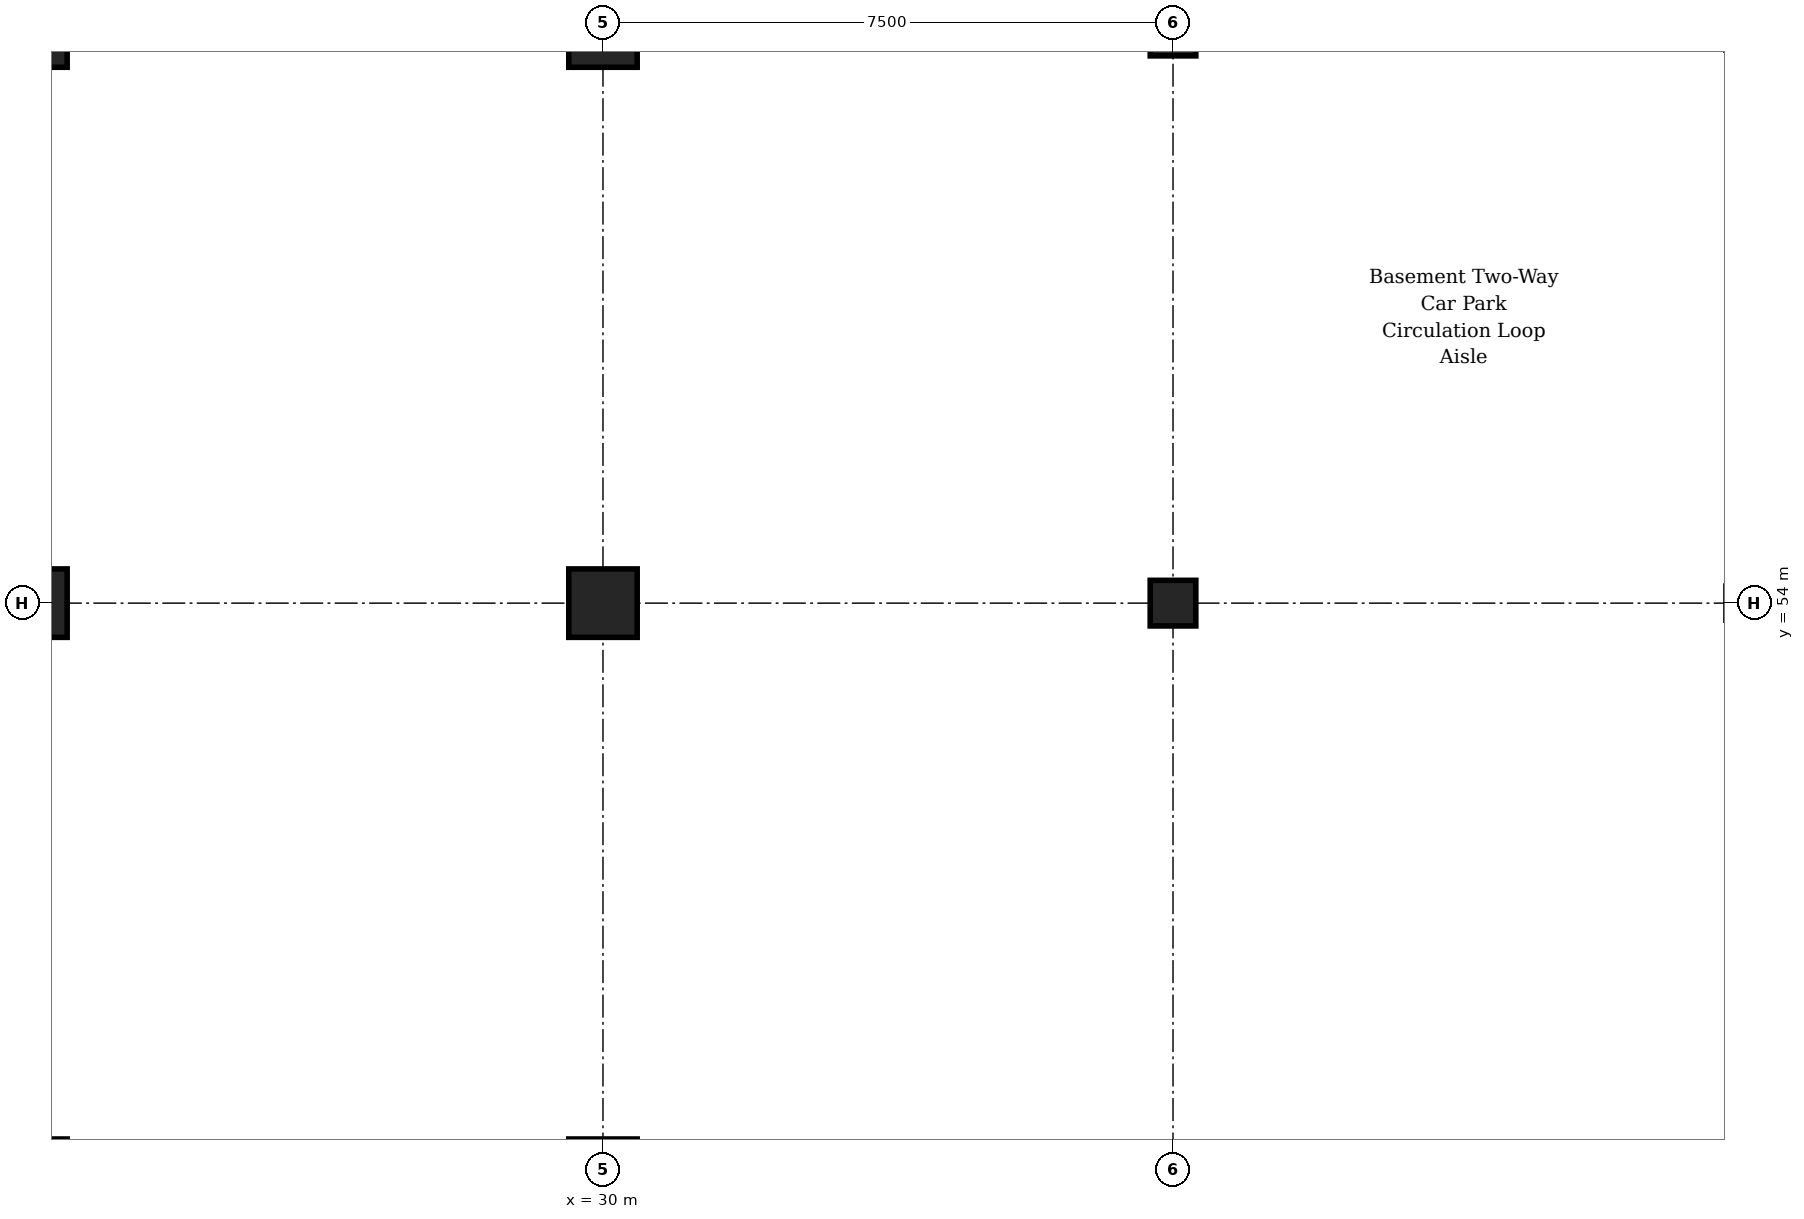
"""IFC4 building model, lengths in metres.
Left out: names, types, materials, properties, quantities, classifications, styles, units other than length and angle.
Written with IfcOpenShell. Run it as: python <this file> out.ifc"""

import sys

from ifc_helpers import new_model, si_unit, direction, frame, origin, origin_2d, place, context, subcontext, project, spatial, rectangle, circle, extrude, element, save


model = new_model("IFC4")
c1 = context("Model", 3, precision=1e-05, world=origin(), true_north=direction((0.0, 1.0)))
c2 = subcontext(c1, "Body", "Model", "MODEL_VIEW")
j1 = project(units=[si_unit("LENGTHUNIT", "METRE"), si_unit("PLANEANGLEUNIT", "RADIAN")], contexts=[c1])
p1 = place(None, origin())
s1 = spatial("IfcSite", under=j1, at=p1, CompositionType="ELEMENT")
p2 = place(p1, origin())
s2 = spatial("IfcBuilding", under=s1, at=p2, CompositionType="ELEMENT")
p3 = place(p2, frame((0.0, 0.0, -4.5)))
s3 = spatial("IfcBuildingStorey", under=s2, at=p3, CompositionType="ELEMENT", Elevation=-4.5)
for number, where, z_axis, x_axis in (
    (1, (22.5, 54.0, 0.0), (0.0, 0.0, 1.0), (1.0, 0.0, 0.0)),
    (2, (22.5, 61.5, 0.0), (0.0, 0.0, 1.0), (1.0, 0.0, 0.0)),
    (3, (30.0, 54.0, 0.0), (0.0, 0.0, 1.0), (1.0, 0.0, 0.0)),
):
    element("IfcColumn", number, at=place(p3, frame(where, z_axis=z_axis, x_axis=x_axis)), inside=s3, PredefinedType="COLUMN", context=c2, shape_type="SweptSolid", body=[
        extrude(rectangle(XDim=0.9, YDim=0.9, at=origin_2d()), origin(), (0.0, 0.0, 1.0), 4.5),
    ])
p4 = place(p3, frame((30.0, 61.5, 0.0), z_axis=(0.0, 0.0, 1.0), x_axis=(1.0, 0.0, 0.0)))
e4 = element("IfcColumn", 4, at=p4, inside=s3, PredefinedType="COLUMN", context=c2, shape_type="SweptSolid", body=[
    extrude(circle(Radius=0.45, at=origin_2d()), origin(), (0.0, 0.0, 1.0), 4.5),
])
p5 = place(p3, frame((37.5, 54.0, 0.0), z_axis=(0.0, 0.0, 1.0), x_axis=(1.0, 0.0, 0.0)))
e5 = element("IfcColumn", 5, at=p5, inside=s3, PredefinedType="COLUMN", context=c2, shape_type="SweptSolid", body=[
    extrude(circle(Radius=0.3, at=origin_2d()), origin(), (0.0, 0.0, 1.0), 4.5),
])
p6 = place(p3, frame((37.5, 61.5, 0.0), z_axis=(0.0, 0.0, 1.0), x_axis=(1.0, 0.0, 0.0)))
e6 = element("IfcColumn", 6, at=p6, inside=s3, PredefinedType="COLUMN", context=c2, shape_type="SweptSolid", body=[
    extrude(rectangle(XDim=0.6, YDim=0.6, at=origin_2d()), origin(), (0.0, 0.0, 1.0), 4.5),
])
save(model, sys.argv[1])
